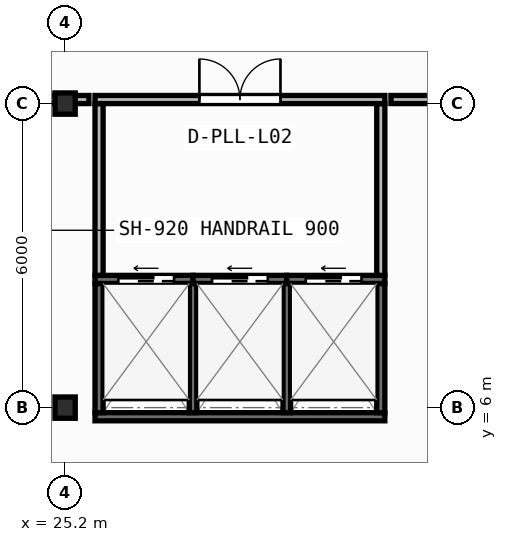
"""IFC4 building model, lengths in metres.
Left out: names, types, materials, properties, quantities, classifications, styles, units other than length and angle.
Written with IfcOpenShell. Run it as: python <this file> out.ifc"""

import sys

from ifc_helpers import new_model, si_unit, direction, frame, frame_2d, origin, origin_2d, place, context, subcontext, project, spatial, rectangle, i_section, extrude, element, fill, save


model = new_model("IFC4")
c1 = context("Model", 3, precision=1e-05, world=origin(), true_north=direction((0.0, 1.0)))
c2 = subcontext(c1, "Body", "Model", "MODEL_VIEW")
j1 = project(units=[si_unit("LENGTHUNIT", "METRE"), si_unit("PLANEANGLEUNIT", "RADIAN")], contexts=[c1])
p1 = place(None, origin())
s1 = spatial("IfcSite", under=j1, at=p1, CompositionType="ELEMENT")
p2 = place(p1, origin())
s2 = spatial("IfcBuilding", under=s1, at=p2, CompositionType="ELEMENT")
p3 = place(p2, frame((0.0, 0.0, 9.0)))
s3 = spatial("IfcBuildingStorey", under=s2, at=p3, CompositionType="ELEMENT", Elevation=9.0)
for number, where, z_axis, x_axis in (
    (1, (25.2, 6.0, 0.0), (0.0, 0.0, 1.0), (1.0, 0.0, 0.0)),
    (2, (25.2, 12.0, 0.0), (0.0, 0.0, 1.0), (1.0, 0.0, 0.0)),
):
    element("IfcColumn", number, at=place(p3, frame(where, z_axis=z_axis, x_axis=x_axis)), inside=s3, PredefinedType="COLUMN", context=c2, shape_type="SweptSolid", body=[
        extrude(i_section(OverallWidth=0.4, OverallDepth=0.42, WebThickness=0.025, FlangeThickness=0.04, at=origin_2d()), origin(), (0.0, 0.0, 1.0), 4.5),
    ])
p4 = place(p3, frame((25.79, 5.82, 0.0), z_axis=(0.0, 0.0, 1.0), x_axis=(1.0, 0.0, 0.0)))
e3 = element("IfcWall", 3, at=p4, inside=s3, PredefinedType="SHEAR", context=c2, shape_type="SweptSolid", body=[
    extrude(rectangle(XDim=5.72, YDim=0.16, at=frame_2d((2.86, 0.0))), origin(), (0.0, 0.0, 1.0), 4.25),
])
for number, where, z_axis, x_axis in (
    (4, (25.87, 5.9, 0.0), (0.0, 0.0, 1.0), (0.0, 1.0, 0.0)),
    (5, (31.43, 5.9, 0.0), (0.0, 0.0, 1.0), (0.0, 1.0, 0.0)),
):
    element("IfcWall", number, at=place(p3, frame(where, z_axis=z_axis, x_axis=x_axis)), inside=s3, PredefinedType="SHEAR", context=c2, shape_type="SweptSolid", body=[
        extrude(rectangle(XDim=2.55, YDim=0.16, at=frame_2d((1.275, 0.0))), origin(), (0.0, 0.0, 1.0), 4.25),
    ])
for number, where, z_axis, x_axis in (
    (6, (27.725, 5.9, 0.0), (0.0, 0.0, 1.0), (0.0, 1.0, 0.0)),
    (7, (29.575, 5.9, 0.0), (0.0, 0.0, 1.0), (0.0, 1.0, 0.0)),
):
    element("IfcWall", number, at=place(p3, frame(where, z_axis=z_axis, x_axis=x_axis)), inside=s3, PredefinedType="SHEAR", context=c2, shape_type="SweptSolid", body=[
        extrude(rectangle(XDim=2.55, YDim=0.15, at=frame_2d((1.275, 0.0))), origin(), (0.0, 0.0, 1.0), 4.25),
    ])
p5 = place(p3, frame((25.79, 8.53, 0.0), z_axis=(0.0, 0.0, 1.0), x_axis=(1.0, 0.0, 0.0)))
e8 = element("IfcWall", 8, at=p5, inside=s3, PredefinedType="SHEAR", context=c2, shape_type="SweptSolid", body=[
    extrude(rectangle(XDim=1.935, YDim=0.16, at=frame_2d((0.968, 0.0))), origin(), (0.0, 0.0, 1.0), 4.25),
])
p6 = place(p5, frame((0.46, 0.0, 0.0)))
e9 = element("IfcOpeningElement", 9, at=p6, cuts=e8, PredefinedType="OPENING", context=c2, shape_type="SweptSolid", body=[
    extrude(rectangle(XDim=1.1, YDim=2.15, at=frame_2d((0.55, 1.075))), frame((0.0, 0.09, 0.0), z_axis=(0.0, -1.0, 0.0), x_axis=(1.0, 0.0, 0.0)), (0.0, 0.0, 1.0), 0.18),
])
p7 = place(p3, frame((27.725, 8.53, 0.0), z_axis=(0.0, 0.0, 1.0), x_axis=(1.0, 0.0, 0.0)))
e10 = element("IfcWall", 10, at=p7, inside=s3, PredefinedType="SHEAR", context=c2, shape_type="SweptSolid", body=[
    extrude(rectangle(XDim=1.85, YDim=0.16, at=frame_2d((0.925, 0.0))), origin(), (0.0, 0.0, 1.0), 4.25),
])
p8 = place(p7, frame((0.375, 0.0, 0.0)))
e11 = element("IfcOpeningElement", 11, at=p8, cuts=e10, PredefinedType="OPENING", context=c2, shape_type="SweptSolid", body=[
    extrude(rectangle(XDim=1.1, YDim=2.15, at=frame_2d((0.55, 1.075))), frame((0.0, 0.09, 0.0), z_axis=(0.0, -1.0, 0.0), x_axis=(1.0, 0.0, 0.0)), (0.0, 0.0, 1.0), 0.18),
])
p9 = place(p3, frame((29.575, 8.53, 0.0), z_axis=(0.0, 0.0, 1.0), x_axis=(1.0, 0.0, 0.0)))
e12 = element("IfcWall", 12, at=p9, inside=s3, PredefinedType="SHEAR", context=c2, shape_type="SweptSolid", body=[
    extrude(rectangle(XDim=1.935, YDim=0.16, at=frame_2d((0.968, 0.0))), origin(), (0.0, 0.0, 1.0), 4.25),
])
p10 = place(p9, frame((0.375, 0.0, 0.0)))
e13 = element("IfcOpeningElement", 13, at=p10, cuts=e12, PredefinedType="OPENING", context=c2, shape_type="SweptSolid", body=[
    extrude(rectangle(XDim=1.1, YDim=2.15, at=frame_2d((0.55, 1.075))), frame((0.0, 0.09, 0.0), z_axis=(0.0, -1.0, 0.0), x_axis=(1.0, 0.0, 0.0)), (0.0, 0.0, 1.0), 0.18),
])
for number, where, z_axis, x_axis in (
    (14, (25.87, 8.61, 0.0), (0.0, 0.0, 1.0), (0.0, 1.0, 0.0)),
    (15, (31.43, 8.61, 0.0), (0.0, 0.0, 1.0), (0.0, 1.0, 0.0)),
):
    element("IfcWall", number, at=place(p3, frame(where, z_axis=z_axis, x_axis=x_axis)), inside=s3, PredefinedType="PARTITIONING", context=c2, shape_type="SweptSolid", body=[
        extrude(rectangle(XDim=3.39, YDim=0.16, at=frame_2d((1.695, 0.0))), origin(), (0.0, 0.0, 1.0), 4.25),
    ])
p11 = place(p3, frame((25.79, 12.08, 0.0), z_axis=(0.0, 0.0, 1.0), x_axis=(1.0, 0.0, 0.0)))
e16 = element("IfcWall", 16, at=p11, inside=s3, PredefinedType="PARTITIONING", context=c2, shape_type="SweptSolid", body=[
    extrude(rectangle(XDim=5.72, YDim=0.16, at=frame_2d((2.86, 0.0))), origin(), (0.0, 0.0, 1.0), 3.425),
])
p12 = place(p11, frame((2.06, 0.0, 0.0)))
e17 = element("IfcOpeningElement", 17, at=p12, cuts=e16, PredefinedType="OPENING", context=c2, shape_type="SweptSolid", body=[
    extrude(rectangle(XDim=1.6, YDim=2.05, at=frame_2d((0.8, 1.025))), frame((0.0, 0.09, 0.0), z_axis=(0.0, -1.0, 0.0), x_axis=(1.0, 0.0, 0.0)), (0.0, 0.0, 1.0), 0.18),
])
p13 = place(p3, frame((24.02, 12.08, 0.0), z_axis=(0.0, 0.0, 1.0), x_axis=(1.0, 0.0, 0.0)))
e18 = element("IfcWall", 18, at=p13, inside=s3, PredefinedType="PARTITIONING", context=c2, shape_type="SweptSolid", body=[
    extrude(rectangle(XDim=1.65, YDim=0.16, at=frame_2d((0.825, 0.0))), origin(), (0.0, 0.0, 1.0), 3.425),
])
p14 = place(p3, frame((31.63, 12.08, 0.0), z_axis=(0.0, 0.0, 1.0), x_axis=(1.0, 0.0, 0.0)))
e19 = element("IfcWall", 19, at=p14, inside=s3, PredefinedType="PARTITIONING", context=c2, shape_type="SweptSolid", body=[
    extrude(rectangle(XDim=11.181, YDim=0.16, at=frame_2d((5.59, 0.0))), origin(), (0.0, 0.0, 1.0), 3.425),
])
p15 = place(p6, origin())
e20 = element("IfcDoor", 20, at=p15, inside=s3, OperationType="SLIDING_TO_LEFT", PredefinedType="DOOR", context=c2, shape_type="SweptSolid", body=[
    extrude(rectangle(XDim=1.1, YDim=2.15, at=frame_2d((0.55, 1.075))), frame((0.0, 0.025, 0.0), z_axis=(0.0, -1.0, 0.0), x_axis=(1.0, 0.0, 0.0)), (0.0, 0.0, 1.0), 0.05),
])
fill(e9, e20)
p16 = place(p8, origin())
e21 = element("IfcDoor", 21, at=p16, inside=s3, OperationType="SLIDING_TO_LEFT", PredefinedType="DOOR", context=c2, shape_type="SweptSolid", body=[
    extrude(rectangle(XDim=1.1, YDim=2.15, at=frame_2d((0.55, 1.075))), frame((0.0, 0.025, 0.0), z_axis=(0.0, -1.0, 0.0), x_axis=(1.0, 0.0, 0.0)), (0.0, 0.0, 1.0), 0.05),
])
fill(e11, e21)
p17 = place(p10, origin())
e22 = element("IfcDoor", 22, at=p17, inside=s3, OperationType="SLIDING_TO_LEFT", PredefinedType="DOOR", context=c2, shape_type="SweptSolid", body=[
    extrude(rectangle(XDim=1.1, YDim=2.15, at=frame_2d((0.55, 1.075))), frame((0.0, 0.025, 0.0), z_axis=(0.0, -1.0, 0.0), x_axis=(1.0, 0.0, 0.0)), (0.0, 0.0, 1.0), 0.05),
])
fill(e13, e22)
p18 = place(p12, origin())
e23 = element("IfcDoor", 23, at=p18, inside=s3, OperationType="DOUBLE_DOOR_SINGLE_SWING", PredefinedType="DOOR", context=c2, shape_type="SweptSolid", body=[
    extrude(rectangle(XDim=1.6, YDim=2.05, at=frame_2d((0.8, 1.025))), frame((0.0, 0.025, 0.0), z_axis=(0.0, -1.0, 0.0), x_axis=(1.0, 0.0, 0.0)), (0.0, 0.0, 1.0), 0.05),
])
fill(e17, e23)
save(model, sys.argv[1])
